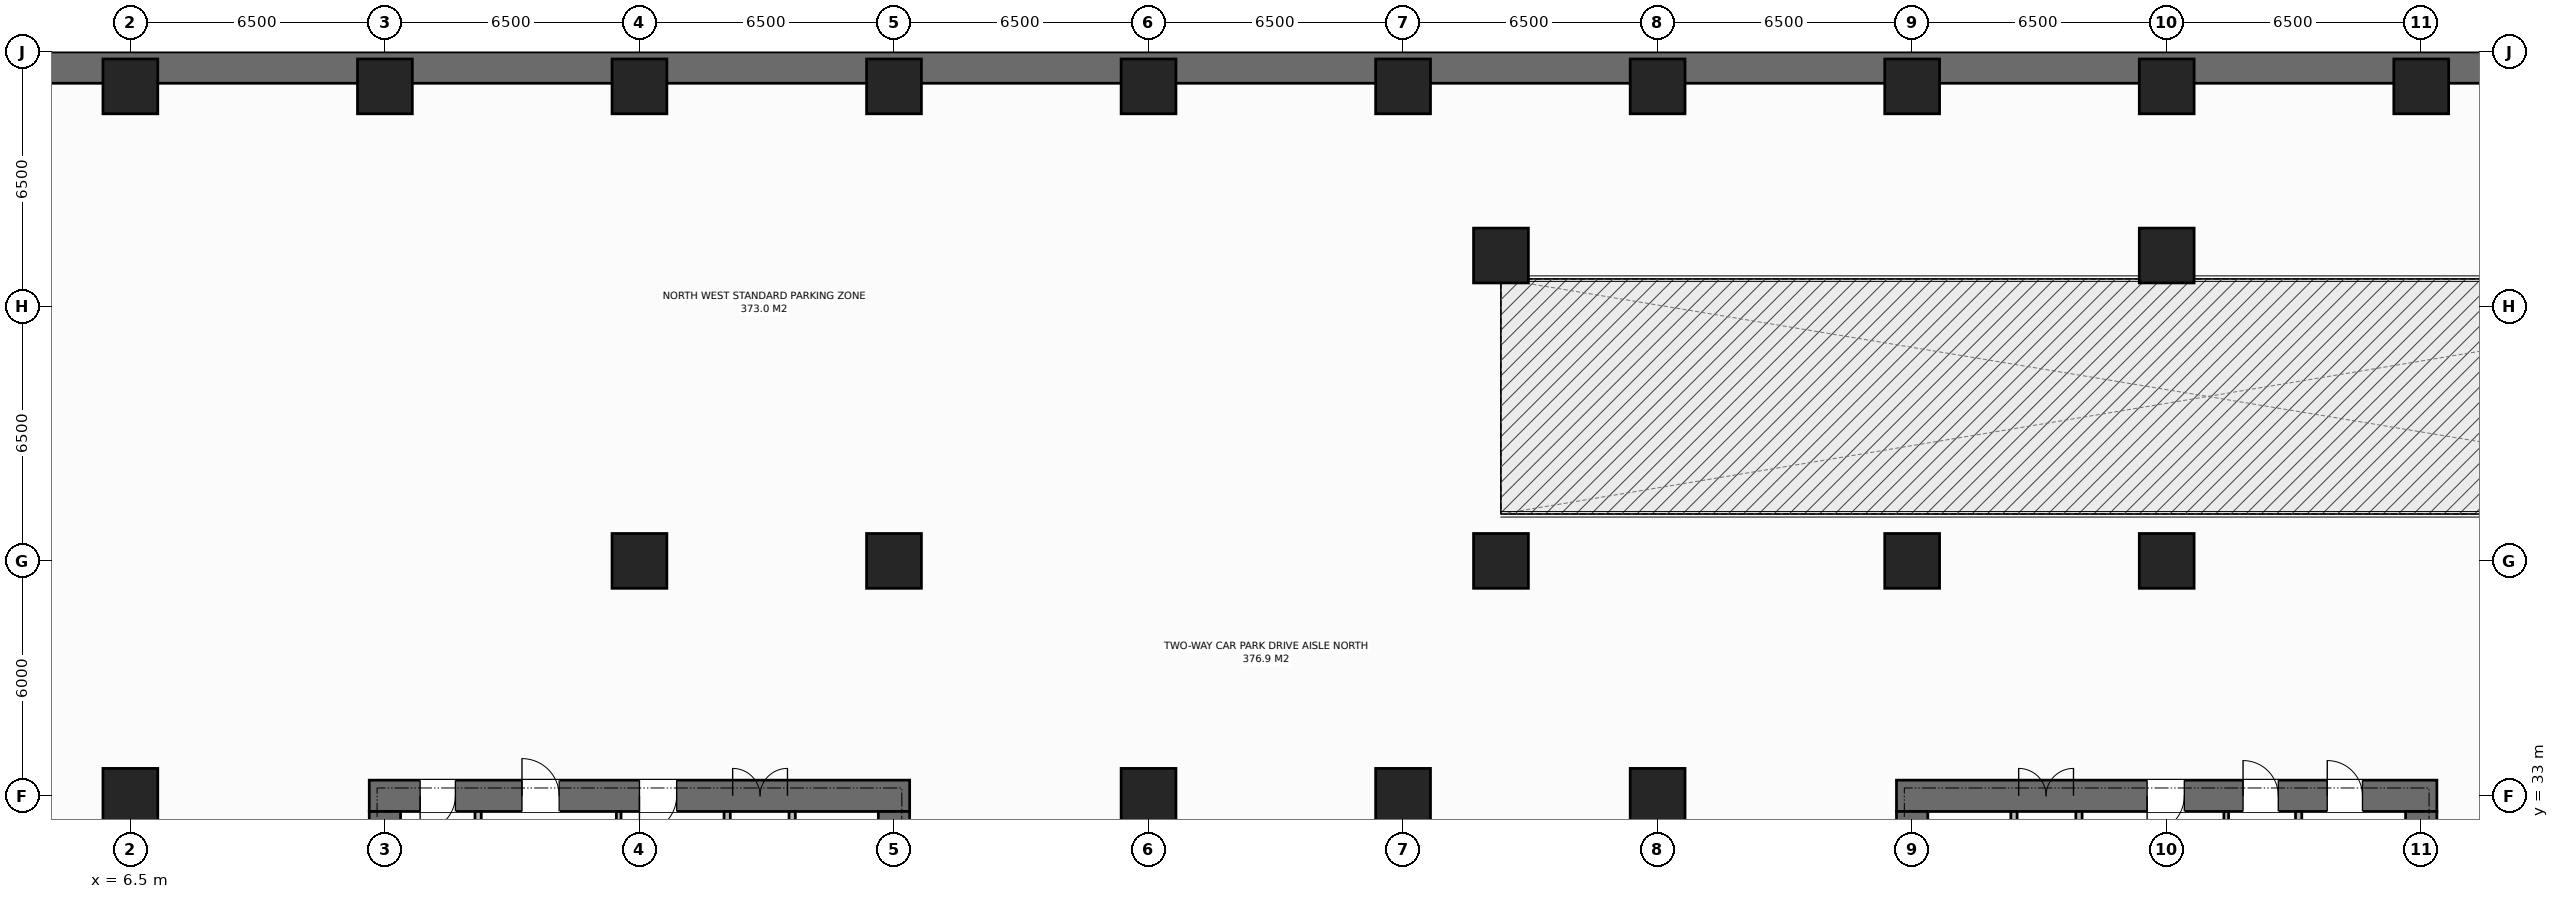
"""IFC4 building model, lengths in metres.
Left out: names, types, materials, properties, quantities, classifications, styles, units other than length and angle.
Written with IfcOpenShell. Run it as: python <this file> out.ifc"""

import sys

from ifc_helpers import new_model, si_unit, direction, frame, frame_2d, origin, origin_2d, place, context, subcontext, project, spatial, rectangle, extrude, element, fill, save


model = new_model("IFC4")
c1 = context("Model", 3, precision=1e-05, world=origin(), true_north=direction((0.0, 1.0)))
c2 = subcontext(c1, "Body", "Model", "MODEL_VIEW")
j1 = project(units=[si_unit("LENGTHUNIT", "METRE"), si_unit("PLANEANGLEUNIT", "RADIAN")], contexts=[c1])
p1 = place(None, origin())
s1 = spatial("IfcSite", under=j1, at=p1, CompositionType="ELEMENT")
p2 = place(p1, origin())
s2 = spatial("IfcBuilding", under=s1, at=p2, CompositionType="ELEMENT")
p3 = place(p2, frame((0.0, 0.0, -9.0)))
s3 = spatial("IfcBuildingStorey", under=s2, at=p3, CompositionType="ELEMENT", Elevation=-9.0)
p4 = place(p3, frame((78.2, 51.6, 0.0), z_axis=(0.0, 0.0, 1.0), x_axis=(-1.0, 0.0, 0.0)))
e1 = element("IfcWall", 1, at=p4, inside=s3, PredefinedType="USERDEFINED", context=c2, shape_type="SweptSolid", body=[
    extrude(rectangle(XDim=78.4, YDim=0.8, at=frame_2d((39.2, 0.0))), origin(), (0.0, 0.0, 1.0), 4.2),
])
p5 = place(p3, frame((12.6, 33.0, 0.0), z_axis=(0.0, 0.0, 1.0), x_axis=(1.0, 0.0, 0.0)))
e2 = element("IfcWall", 2, at=p5, inside=s3, PredefinedType="SHEAR", context=c2, shape_type="SweptSolid", body=[
    extrude(rectangle(XDim=13.8, YDim=0.8, at=frame_2d((6.9, 0.0))), origin(), (0.0, 0.0, 1.0), 4.5),
])
p6 = place(p5, frame((1.3, 0.0, 0.0)))
e3 = element("IfcOpeningElement", 3, at=p6, cuts=e2, PredefinedType="OPENING", context=c2, shape_type="SweptSolid", body=[
    extrude(rectangle(XDim=0.9, YDim=2.15, at=frame_2d((0.45, 1.075))), frame((0.0, 0.41, 0.0), z_axis=(0.0, -1.0, 0.0), x_axis=(1.0, 0.0, 0.0)), (0.0, 0.0, 1.0), 0.82),
])
p7 = place(p5, frame((3.9, 0.0, 0.0)))
e4 = element("IfcOpeningElement", 4, at=p7, cuts=e2, PredefinedType="OPENING", context=c2, shape_type="SweptSolid", body=[
    extrude(rectangle(XDim=0.95, YDim=2.15, at=frame_2d((0.475, 1.075))), frame((0.0, 0.41, 0.0), z_axis=(0.0, -1.0, 0.0), x_axis=(1.0, 0.0, 0.0)), (0.0, 0.0, 1.0), 0.82),
])
p8 = place(p5, frame((6.9, 0.0, 0.0)))
e5 = element("IfcOpeningElement", 5, at=p8, cuts=e2, PredefinedType="OPENING", context=c2, shape_type="SweptSolid", body=[
    extrude(rectangle(XDim=0.95, YDim=2.15, at=frame_2d((0.475, 1.075))), frame((0.0, 0.41, 0.0), z_axis=(0.0, -1.0, 0.0), x_axis=(1.0, 0.0, 0.0)), (0.0, 0.0, 1.0), 0.82),
])
p9 = place(p5, frame((9.28, 0.0, 0.0)))
e6 = element("IfcOpeningElement", 6, at=p9, cuts=e2, PredefinedType="OPENING", context=c2, shape_type="SweptSolid", body=[
    extrude(rectangle(XDim=1.4, YDim=2.2, at=frame_2d((0.7, 1.1))), frame((0.0, 0.41, 0.0), z_axis=(0.0, -1.0, 0.0), x_axis=(1.0, 0.0, 0.0)), (0.0, 0.0, 1.0), 0.82),
])
p10 = place(p3, frame((13.0, 19.4, 0.0), z_axis=(0.0, 0.0, 1.0), x_axis=(0.0, 1.0, 0.0)))
e7 = element("IfcWall", 7, at=p10, inside=s3, PredefinedType="SHEAR", context=c2, shape_type="SweptSolid", body=[
    extrude(rectangle(XDim=13.2, YDim=0.8, at=frame_2d((6.6, 0.0))), origin(), (0.0, 0.0, 1.0), 4.5),
])
p11 = place(p10, frame((4.65, 0.0, 0.0)))
e8 = element("IfcOpeningElement", 8, at=p11, cuts=e7, PredefinedType="OPENING", context=c2, shape_type="SweptSolid", body=[
    extrude(rectangle(XDim=1.4, YDim=2.2, at=frame_2d((0.7, 1.1))), frame((0.0, 0.41, 0.0), z_axis=(0.0, -1.0, 0.0), x_axis=(1.0, 0.0, 0.0)), (0.0, 0.0, 1.0), 0.82),
])
p12 = place(p3, frame((26.0, 19.4, 0.0), z_axis=(0.0, 0.0, 1.0), x_axis=(0.0, 1.0, 0.0)))
e9 = element("IfcWall", 9, at=p12, inside=s3, PredefinedType="SHEAR", context=c2, shape_type="SweptSolid", body=[
    extrude(rectangle(XDim=13.2, YDim=0.8, at=frame_2d((6.6, 0.0))), origin(), (0.0, 0.0, 1.0), 4.5),
])
p13 = place(p3, frame((51.6, 33.0, 0.0), z_axis=(0.0, 0.0, 1.0), x_axis=(1.0, 0.0, 0.0)))
e10 = element("IfcWall", 10, at=p13, inside=s3, PredefinedType="SHEAR", context=c2, shape_type="SweptSolid", body=[
    extrude(rectangle(XDim=13.8, YDim=0.8, at=frame_2d((6.9, 0.0))), origin(), (0.0, 0.0, 1.0), 4.5),
])
p14 = place(p13, frame((3.12, 0.0, 0.0)))
e11 = element("IfcOpeningElement", 11, at=p14, cuts=e10, PredefinedType="OPENING", context=c2, shape_type="SweptSolid", body=[
    extrude(rectangle(XDim=1.4, YDim=2.2, at=frame_2d((0.7, 1.1))), frame((0.0, 0.41, 0.0), z_axis=(0.0, -1.0, 0.0), x_axis=(1.0, 0.0, 0.0)), (0.0, 0.0, 1.0), 0.82),
])
p15 = place(p13, frame((11.0, 0.0, 0.0)))
e12 = element("IfcOpeningElement", 12, at=p15, cuts=e10, PredefinedType="OPENING", context=c2, shape_type="SweptSolid", body=[
    extrude(rectangle(XDim=0.9, YDim=2.15, at=frame_2d((0.45, 1.075))), frame((0.0, 0.41, 0.0), z_axis=(0.0, -1.0, 0.0), x_axis=(1.0, 0.0, 0.0)), (0.0, 0.0, 1.0), 0.82),
])
p16 = place(p13, frame((6.4, 0.0, 0.0)))
e13 = element("IfcOpeningElement", 13, at=p16, cuts=e10, PredefinedType="OPENING", context=c2, shape_type="SweptSolid", body=[
    extrude(rectangle(XDim=0.95, YDim=2.15, at=frame_2d((0.475, 1.075))), frame((0.0, 0.41, 0.0), z_axis=(0.0, -1.0, 0.0), x_axis=(1.0, 0.0, 0.0)), (0.0, 0.0, 1.0), 0.82),
])
p17 = place(p13, frame((8.85, 0.0, 0.0)))
e14 = element("IfcOpeningElement", 14, at=p17, cuts=e10, PredefinedType="OPENING", context=c2, shape_type="SweptSolid", body=[
    extrude(rectangle(XDim=0.9, YDim=2.15, at=frame_2d((0.45, 1.075))), frame((0.0, 0.41, 0.0), z_axis=(0.0, -1.0, 0.0), x_axis=(1.0, 0.0, 0.0)), (0.0, 0.0, 1.0), 0.82),
])
p18 = place(p3, frame((52.0, 19.4, 0.0), z_axis=(0.0, 0.0, 1.0), x_axis=(0.0, 1.0, 0.0)))
e15 = element("IfcWall", 15, at=p18, inside=s3, PredefinedType="SHEAR", context=c2, shape_type="SweptSolid", body=[
    extrude(rectangle(XDim=13.2, YDim=0.8, at=frame_2d((6.6, 0.0))), origin(), (0.0, 0.0, 1.0), 4.5),
])
p19 = place(p3, frame((65.0, 19.4, 0.0), z_axis=(0.0, 0.0, 1.0), x_axis=(0.0, 1.0, 0.0)))
e16 = element("IfcWall", 16, at=p19, inside=s3, PredefinedType="SHEAR", context=c2, shape_type="SweptSolid", body=[
    extrude(rectangle(XDim=13.2, YDim=0.8, at=frame_2d((6.6, 0.0))), origin(), (0.0, 0.0, 1.0), 4.5),
])
p20 = place(p19, frame((8.05, 0.0, 0.0)))
e17 = element("IfcOpeningElement", 17, at=p20, cuts=e16, PredefinedType="OPENING", context=c2, shape_type="SweptSolid", body=[
    extrude(rectangle(XDim=1.3, YDim=2.2, at=frame_2d((0.65, 1.1))), frame((0.0, 0.41, 0.0), z_axis=(0.0, -1.0, 0.0), x_axis=(1.0, 0.0, 0.0)), (0.0, 0.0, 1.0), 0.82),
])
for number, where, z_axis, x_axis in (
    (18, (19.5, 39.0, 0.0), (0.0, 0.0, 1.0), (1.0, 0.0, 0.0)),
    (19, (58.5, 39.0, 0.0), (0.0, 0.0, 1.0), (1.0, 0.0, 0.0)),
    (20, (6.5, 33.0, 0.0), (0.0, 0.0, 1.0), (1.0, 0.0, 0.0)),
    (21, (32.5, 33.0, 0.0), (0.0, 0.0, 1.0), (1.0, 0.0, 0.0)),
    (22, (39.0, 33.0, 0.0), (0.0, 0.0, 1.0), (1.0, 0.0, 0.0)),
    (23, (45.5, 33.0, 0.0), (0.0, 0.0, 1.0), (1.0, 0.0, 0.0)),
    (24, (41.5, 39.0, 0.0), (0.0, 0.0, 1.0), (1.0, 0.0, 0.0)),
    (25, (41.5, 46.8, 0.0), (0.0, 0.0, 1.0), (1.0, 0.0, 0.0)),
    (26, (58.5, 46.8, 0.0), (0.0, 0.0, 1.0), (1.0, 0.0, 0.0)),
    (27, (26.0, 39.0, 0.0), (0.0, 0.0, 1.0), (1.0, 0.0, 0.0)),
    (28, (52.0, 39.0, 0.0), (0.0, 0.0, 1.0), (1.0, 0.0, 0.0)),
    (29, (6.5, 51.12, 0.0), (0.0, 0.0, 1.0), (1.0, 0.0, 0.0)),
    (30, (13.0, 51.12, 0.0), (0.0, 0.0, 1.0), (1.0, 0.0, 0.0)),
    (31, (19.5, 51.12, 0.0), (0.0, 0.0, 1.0), (1.0, 0.0, 0.0)),
    (32, (26.0, 51.12, 0.0), (0.0, 0.0, 1.0), (1.0, 0.0, 0.0)),
    (33, (32.5, 51.12, 0.0), (0.0, 0.0, 1.0), (1.0, 0.0, 0.0)),
    (34, (39.0, 51.12, 0.0), (0.0, 0.0, 1.0), (1.0, 0.0, 0.0)),
    (35, (45.5, 51.12, 0.0), (0.0, 0.0, 1.0), (1.0, 0.0, 0.0)),
    (36, (52.0, 51.12, 0.0), (0.0, 0.0, 1.0), (1.0, 0.0, 0.0)),
    (37, (58.5, 51.12, 0.0), (0.0, 0.0, 1.0), (1.0, 0.0, 0.0)),
    (38, (65.0, 51.12, 0.0), (0.0, 0.0, 1.0), (1.0, 0.0, 0.0)),
):
    element("IfcColumn", number, at=place(p3, frame(where, z_axis=z_axis, x_axis=x_axis)), inside=s3, PredefinedType="COLUMN", context=c2, shape_type="SweptSolid", body=[
        extrude(rectangle(XDim=1.4, YDim=1.4, at=origin_2d()), origin(), (0.0, 0.0, 1.0), 4.5),
    ])
p21 = place(p3, frame((15.38, 26.56, 0.0), z_axis=(0.0, 0.0, 1.0), x_axis=(0.0, 1.0, 0.0)))
e39 = element("IfcWall", 39, at=p21, inside=s3, PredefinedType="STANDARD", context=c2, shape_type="SweptSolid", body=[
    extrude(rectangle(XDim=6.04, YDim=0.16, at=frame_2d((3.02, 0.0))), origin(), (0.0, 0.0, 1.0), 4.2),
])
p22 = place(p3, frame((18.97, 26.56, 0.0), z_axis=(0.0, 0.0, 1.0), x_axis=(0.0, 1.0, 0.0)))
e40 = element("IfcWall", 40, at=p22, inside=s3, PredefinedType="PARTITIONING", context=c2, shape_type="SweptSolid", body=[
    extrude(rectangle(XDim=6.04, YDim=0.12, at=frame_2d((3.02, 0.0))), origin(), (0.0, 0.0, 1.0), 4.2),
])
p23 = place(p3, frame((21.74, 26.56, 0.0), z_axis=(0.0, 0.0, 1.0), x_axis=(0.0, 1.0, 0.0)))
e41 = element("IfcWall", 41, at=p23, inside=s3, PredefinedType="STANDARD", context=c2, shape_type="SweptSolid", body=[
    extrude(rectangle(XDim=6.04, YDim=0.16, at=frame_2d((3.02, 0.0))), origin(), (0.0, 0.0, 1.0), 4.2),
])
p24 = place(p3, frame((23.4, 19.4, 0.0), z_axis=(0.0, 0.0, 1.0), x_axis=(0.0, 1.0, 0.0)))
e42 = element("IfcWall", 42, at=p24, inside=s3, PredefinedType="STANDARD", context=c2, shape_type="SweptSolid", body=[
    extrude(rectangle(XDim=13.2, YDim=0.16, at=frame_2d((6.6, 0.0))), origin(), (0.0, 0.0, 1.0), 4.2),
])
p25 = place(p24, frame((1.2, 0.0, 0.0)))
e43 = element("IfcOpeningElement", 43, at=p25, cuts=e42, PredefinedType="OPENING", context=c2, shape_type="SweptSolid", body=[
    extrude(rectangle(XDim=0.95, YDim=2.15, at=frame_2d((0.475, 1.075))), frame((0.0, 0.09, 0.0), z_axis=(0.0, -1.0, 0.0), x_axis=(1.0, 0.0, 0.0)), (0.0, 0.0, 1.0), 0.18),
])
p26 = place(p3, frame((54.6, 19.4, 0.0), z_axis=(0.0, 0.0, 1.0), x_axis=(0.0, 1.0, 0.0)))
e44 = element("IfcWall", 44, at=p26, inside=s3, PredefinedType="STANDARD", context=c2, shape_type="SweptSolid", body=[
    extrude(rectangle(XDim=13.2, YDim=0.16, at=frame_2d((6.6, 0.0))), origin(), (0.0, 0.0, 1.0), 4.2),
])
p27 = place(p26, frame((1.2, 0.0, 0.0)))
e45 = element("IfcOpeningElement", 45, at=p27, cuts=e44, PredefinedType="OPENING", context=c2, shape_type="SweptSolid", body=[
    extrude(rectangle(XDim=0.95, YDim=2.15, at=frame_2d((0.475, 1.075))), frame((0.0, 0.09, 0.0), z_axis=(0.0, -1.0, 0.0), x_axis=(1.0, 0.0, 0.0)), (0.0, 0.0, 1.0), 0.18),
])
p28 = place(p3, frame((56.26, 23.09, 0.0), z_axis=(0.0, 0.0, 1.0), x_axis=(0.0, 1.0, 0.0)))
e46 = element("IfcWall", 46, at=p28, inside=s3, PredefinedType="STANDARD", context=c2, shape_type="SweptSolid", body=[
    extrude(rectangle(XDim=9.51, YDim=0.16, at=frame_2d((4.755, 0.0))), origin(), (0.0, 0.0, 1.0), 4.2),
])
p29 = place(p28, frame((1.01, 0.0, 0.0)))
e47 = element("IfcOpeningElement", 47, at=p29, cuts=e46, PredefinedType="OPENING", context=c2, shape_type="SweptSolid", body=[
    extrude(rectangle(XDim=1.3, YDim=2.2, at=frame_2d((0.65, 1.1))), frame((0.0, 0.09, 0.0), z_axis=(0.0, -1.0, 0.0), x_axis=(1.0, 0.0, 0.0)), (0.0, 0.0, 1.0), 0.18),
])
p30 = place(p3, frame((61.87, 26.56, 0.0), z_axis=(0.0, 0.0, 1.0), x_axis=(0.0, 1.0, 0.0)))
e48 = element("IfcWall", 48, at=p30, inside=s3, PredefinedType="STANDARD", context=c2, shape_type="SweptSolid", body=[
    extrude(rectangle(XDim=6.04, YDim=0.16, at=frame_2d((3.02, 0.0))), origin(), (0.0, 0.0, 1.0), 4.2),
])
p31 = place(p3, frame((60.02, 26.56, 0.0), z_axis=(0.0, 0.0, 1.0), x_axis=(0.0, 1.0, 0.0)))
e49 = element("IfcWall", 49, at=p31, inside=s3, PredefinedType="PARTITIONING", context=c2, shape_type="SweptSolid", body=[
    extrude(rectangle(XDim=6.04, YDim=0.12, at=frame_2d((3.02, 0.0))), origin(), (0.0, 0.0, 1.0), 4.2),
])
p32 = place(p6, origin())
e50 = element("IfcDoor", 50, at=p32, inside=s3, OperationType="SINGLE_SWING_RIGHT", PredefinedType="DOOR", context=c2, shape_type="SweptSolid", body=[
    extrude(rectangle(XDim=0.9, YDim=2.15, at=frame_2d((0.45, 1.075))), frame((0.0, -0.075, 0.0), z_axis=(0.0, -1.0, 0.0), x_axis=(1.0, 0.0, 0.0)), (0.0, 0.0, 1.0), 0.05),
])
fill(e3, e50)
p33 = place(p7, origin())
e51 = element("IfcDoor", 51, at=p33, inside=s3, OperationType="SINGLE_SWING_LEFT", PredefinedType="DOOR", context=c2, shape_type="SweptSolid", body=[
    extrude(rectangle(XDim=0.95, YDim=2.15, at=frame_2d((0.475, 1.075))), frame((0.0, -0.075, 0.0), z_axis=(0.0, -1.0, 0.0), x_axis=(1.0, 0.0, 0.0)), (0.0, 0.0, 1.0), 0.05),
])
fill(e4, e51)
p34 = place(p8, origin())
e52 = element("IfcDoor", 52, at=p34, inside=s3, OperationType="SINGLE_SWING_RIGHT", PredefinedType="DOOR", context=c2, shape_type="SweptSolid", body=[
    extrude(rectangle(XDim=0.95, YDim=2.15, at=frame_2d((0.475, 1.075))), frame((0.0, -0.075, 0.0), z_axis=(0.0, -1.0, 0.0), x_axis=(1.0, 0.0, 0.0)), (0.0, 0.0, 1.0), 0.05),
])
fill(e5, e52)
p35 = place(p9, origin())
e53 = element("IfcDoor", 53, at=p35, inside=s3, OperationType="DOUBLE_DOOR_SINGLE_SWING", PredefinedType="DOOR", context=c2, shape_type="SweptSolid", body=[
    extrude(rectangle(XDim=1.4, YDim=2.2, at=frame_2d((0.7, 1.1))), frame((0.0, -0.075, 0.0), z_axis=(0.0, -1.0, 0.0), x_axis=(1.0, 0.0, 0.0)), (0.0, 0.0, 1.0), 0.05),
])
fill(e6, e53)
p36 = place(p14, origin())
e54 = element("IfcDoor", 54, at=p36, inside=s3, OperationType="DOUBLE_DOOR_SINGLE_SWING", PredefinedType="DOOR", context=c2, shape_type="SweptSolid", body=[
    extrude(rectangle(XDim=1.4, YDim=2.2, at=frame_2d((0.7, 1.1))), frame((0.0, -0.075, 0.0), z_axis=(0.0, -1.0, 0.0), x_axis=(1.0, 0.0, 0.0)), (0.0, 0.0, 1.0), 0.05),
])
fill(e11, e54)
p37 = place(p15, origin())
e55 = element("IfcDoor", 55, at=p37, inside=s3, OperationType="SINGLE_SWING_LEFT", PredefinedType="DOOR", context=c2, shape_type="SweptSolid", body=[
    extrude(rectangle(XDim=0.9, YDim=2.15, at=frame_2d((0.45, 1.075))), frame((0.0, -0.075, 0.0), z_axis=(0.0, -1.0, 0.0), x_axis=(1.0, 0.0, 0.0)), (0.0, 0.0, 1.0), 0.05),
])
fill(e12, e55)
p38 = place(p16, origin())
e56 = element("IfcDoor", 56, at=p38, inside=s3, OperationType="SINGLE_SWING_RIGHT", PredefinedType="DOOR", context=c2, shape_type="SweptSolid", body=[
    extrude(rectangle(XDim=0.95, YDim=2.15, at=frame_2d((0.475, 1.075))), frame((0.0, -0.075, 0.0), z_axis=(0.0, -1.0, 0.0), x_axis=(1.0, 0.0, 0.0)), (0.0, 0.0, 1.0), 0.05),
])
fill(e13, e56)
p39 = place(p17, origin())
e57 = element("IfcDoor", 57, at=p39, inside=s3, OperationType="SINGLE_SWING_LEFT", PredefinedType="DOOR", context=c2, shape_type="SweptSolid", body=[
    extrude(rectangle(XDim=0.9, YDim=2.15, at=frame_2d((0.45, 1.075))), frame((0.0, -0.075, 0.0), z_axis=(0.0, -1.0, 0.0), x_axis=(1.0, 0.0, 0.0)), (0.0, 0.0, 1.0), 0.05),
])
fill(e14, e57)
save(model, sys.argv[1])
